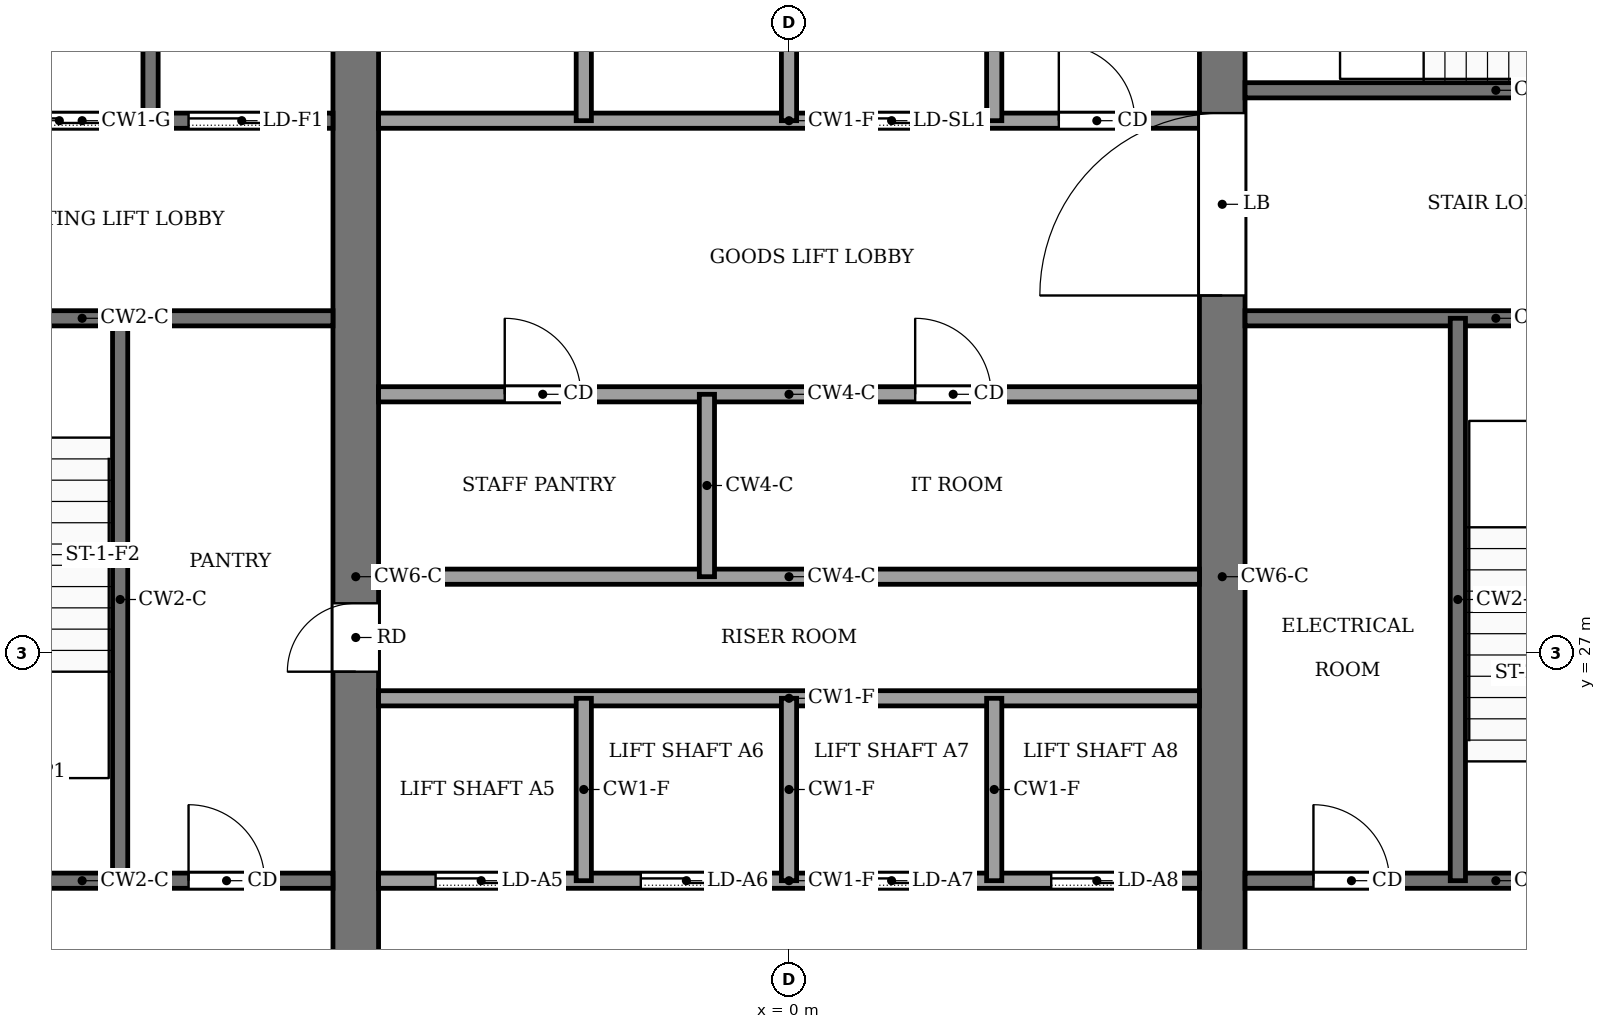
"""IFC4 building model, lengths in metres.
Left out: names, types, materials, properties, quantities, classifications, styles, units other than length and angle.
Written with IfcOpenShell. Run it as: python <this file> out.ifc"""

import sys

from ifc_helpers import new_model, si_unit, direction, frame, frame_2d, origin, place, context, subcontext, project, spatial, rectangle, extrude, element, fill, save


model = new_model("IFC4")
c1 = context("Model", 3, precision=1e-05, world=origin(), true_north=direction((0.0, 1.0)))
c2 = subcontext(c1, "Body", "Model", "MODEL_VIEW")
j1 = project(units=[si_unit("LENGTHUNIT", "METRE"), si_unit("PLANEANGLEUNIT", "RADIAN")], contexts=[c1])
p1 = place(None, origin())
s1 = spatial("IfcSite", under=j1, at=p1, CompositionType="ELEMENT")
p2 = place(p1, origin())
s2 = spatial("IfcBuilding", under=s1, at=p2, CompositionType="ELEMENT")
p3 = place(p2, frame((0.0, 0.0, 238.0)))
s3 = spatial("IfcBuildingStorey", under=s2, at=p3, CompositionType="ELEMENT", Elevation=238.0)
p4 = place(p3, frame((-5.7, 18.4, -0.13), z_axis=(0.0, 0.0, 1.0), x_axis=(0.0, 1.0, 0.0)))
e1 = element("IfcWall", 1, at=p4, inside=s3, PredefinedType="SHEAR", context=c2, shape_type="SweptSolid", body=[
    extrude(rectangle(XDim=19.2, YDim=0.6, at=frame_2d((9.6, 0.0))), origin(), (0.0, 0.0, 1.0), 4.0),
])
p5 = place(p4, frame((8.35, 0.0, 0.13)))
e2 = element("IfcOpeningElement", 2, at=p5, cuts=e1, PredefinedType="OPENING", context=c2, shape_type="SweptSolid", body=[
    extrude(rectangle(XDim=0.9, YDim=2.1, at=frame_2d((0.45, 1.05))), frame((0.0, 0.31, 0.0), z_axis=(0.0, -1.0, 0.0), x_axis=(1.0, 0.0, 0.0)), (0.0, 0.0, 1.0), 0.62),
])
p6 = place(p3, frame((5.7, 18.4, -0.13), z_axis=(0.0, 0.0, 1.0), x_axis=(0.0, 1.0, 0.0)))
e3 = element("IfcWall", 3, at=p6, inside=s3, PredefinedType="SHEAR", context=c2, shape_type="SweptSolid", body=[
    extrude(rectangle(XDim=19.2, YDim=0.6, at=frame_2d((9.6, 0.0))), origin(), (0.0, 0.0, 1.0), 4.0),
])
p7 = place(p6, frame((13.3, 0.0, 0.13)))
e4 = element("IfcOpeningElement", 4, at=p7, cuts=e3, PredefinedType="OPENING", context=c2, shape_type="SweptSolid", body=[
    extrude(rectangle(XDim=2.4, YDim=2.4, at=frame_2d((1.2, 1.2))), frame((0.0, 0.31, 0.0), z_axis=(0.0, -1.0, 0.0), x_axis=(1.0, 0.0, 0.0)), (0.0, 0.0, 1.0), 0.62),
])
p8 = place(p3, frame((-12.6, 24.0, 0.0), z_axis=(0.0, 0.0, 1.0), x_axis=(1.0, 0.0, 0.0)))
e5 = element("IfcWall", 5, at=p8, inside=s3, PredefinedType="PARTITIONING", context=c2, shape_type="SweptSolid", body=[
    extrude(rectangle(XDim=6.6, YDim=0.2, at=frame_2d((3.3, 0.0))), origin(), (0.0, 0.0, 1.0), 3.87),
])
p9 = place(p8, frame((4.7, 0.0, 0.0)))
e6 = element("IfcOpeningElement", 6, at=p9, cuts=e5, PredefinedType="OPENING", context=c2, shape_type="SweptSolid", body=[
    extrude(rectangle(XDim=1.0, YDim=2.1, at=frame_2d((0.5, 1.05))), frame((0.0, 0.11, 0.0), z_axis=(0.0, -1.0, 0.0), x_axis=(1.0, 0.0, 0.0)), (0.0, 0.0, 1.0), 0.22),
])
p10 = place(p3, frame((-5.4, 24.0, 0.0), z_axis=(0.0, 0.0, 1.0), x_axis=(1.0, 0.0, 0.0)))
e7 = element("IfcWall", 7, at=p10, inside=s3, PredefinedType="PARTITIONING", context=c2, shape_type="SweptSolid", body=[
    extrude(rectangle(XDim=10.8, YDim=0.2, at=frame_2d((5.4, 0.0))), origin(), (0.0, 0.0, 1.0), 3.87),
])
p11 = place(p10, frame((0.75, 0.0, 0.0)))
e8 = element("IfcOpeningElement", 8, at=p11, cuts=e7, PredefinedType="OPENING", context=c2, shape_type="SweptSolid", body=[
    extrude(rectangle(XDim=1.2, YDim=2.2, at=frame_2d((0.6, 1.1))), frame((0.0, 0.11, 0.0), z_axis=(0.0, -1.0, 0.0), x_axis=(1.0, 0.0, 0.0)), (0.0, 0.0, 1.0), 0.22),
])
p12 = place(p10, frame((3.45, 0.0, 0.0)))
e9 = element("IfcOpeningElement", 9, at=p12, cuts=e7, PredefinedType="OPENING", context=c2, shape_type="SweptSolid", body=[
    extrude(rectangle(XDim=1.2, YDim=2.2, at=frame_2d((0.6, 1.1))), frame((0.0, 0.11, 0.0), z_axis=(0.0, -1.0, 0.0), x_axis=(1.0, 0.0, 0.0)), (0.0, 0.0, 1.0), 0.22),
])
p13 = place(p10, frame((6.15, 0.0, 0.0)))
e10 = element("IfcOpeningElement", 10, at=p13, cuts=e7, PredefinedType="OPENING", context=c2, shape_type="SweptSolid", body=[
    extrude(rectangle(XDim=1.2, YDim=2.2, at=frame_2d((0.6, 1.1))), frame((0.0, 0.11, 0.0), z_axis=(0.0, -1.0, 0.0), x_axis=(1.0, 0.0, 0.0)), (0.0, 0.0, 1.0), 0.22),
])
p14 = place(p10, frame((8.85, 0.0, 0.0)))
e11 = element("IfcOpeningElement", 11, at=p14, cuts=e7, PredefinedType="OPENING", context=c2, shape_type="SweptSolid", body=[
    extrude(rectangle(XDim=1.2, YDim=2.2, at=frame_2d((0.6, 1.1))), frame((0.0, 0.11, 0.0), z_axis=(0.0, -1.0, 0.0), x_axis=(1.0, 0.0, 0.0)), (0.0, 0.0, 1.0), 0.22),
])
p15 = place(p3, frame((6.0, 24.0, 0.0), z_axis=(0.0, 0.0, 1.0), x_axis=(1.0, 0.0, 0.0)))
e12 = element("IfcWall", 12, at=p15, inside=s3, PredefinedType="PARTITIONING", context=c2, shape_type="SweptSolid", body=[
    extrude(rectangle(XDim=6.6, YDim=0.2, at=frame_2d((3.3, 0.0))), origin(), (0.0, 0.0, 1.0), 3.87),
])
p16 = place(p15, frame((0.9, 0.0, 0.0)))
e13 = element("IfcOpeningElement", 13, at=p16, cuts=e12, PredefinedType="OPENING", context=c2, shape_type="SweptSolid", body=[
    extrude(rectangle(XDim=1.0, YDim=2.1, at=frame_2d((0.5, 1.05))), frame((0.0, 0.11, 0.0), z_axis=(0.0, -1.0, 0.0), x_axis=(1.0, 0.0, 0.0)), (0.0, 0.0, 1.0), 0.22),
])
p17 = place(p15, frame((4.4, 0.0, 0.0)))
e14 = element("IfcOpeningElement", 14, at=p17, cuts=e12, PredefinedType="OPENING", context=c2, shape_type="SweptSolid", body=[
    extrude(rectangle(XDim=1.2, YDim=2.2, at=frame_2d((0.6, 1.1))), frame((0.0, 0.11, 0.0), z_axis=(0.0, -1.0, 0.0), x_axis=(1.0, 0.0, 0.0)), (0.0, 0.0, 1.0), 0.22),
])
for number, where, z_axis, x_axis in (
    (15, (-5.4, 26.4, 0.0), (0.0, 0.0, 1.0), (1.0, 0.0, 0.0)),
    (16, (-5.4, 28.0, 0.0), (0.0, 0.0, 1.0), (1.0, 0.0, 0.0)),
):
    element("IfcWall", number, at=place(p3, frame(where, z_axis=z_axis, x_axis=x_axis)), inside=s3, PredefinedType="PARTITIONING", context=c2, shape_type="SweptSolid", body=[
        extrude(rectangle(XDim=10.8, YDim=0.2, at=frame_2d((5.4, 0.0))), origin(), (0.0, 0.0, 1.0), 3.87),
    ])
p18 = place(p3, frame((-5.4, 30.4, 0.0), z_axis=(0.0, 0.0, 1.0), x_axis=(1.0, 0.0, 0.0)))
e17 = element("IfcWall", 17, at=p18, inside=s3, PredefinedType="PARTITIONING", context=c2, shape_type="SweptSolid", body=[
    extrude(rectangle(XDim=10.8, YDim=0.2, at=frame_2d((5.4, 0.0))), origin(), (0.0, 0.0, 1.0), 3.87),
])
p19 = place(p18, frame((1.66, 0.0, 0.0)))
e18 = element("IfcOpeningElement", 18, at=p19, cuts=e17, PredefinedType="OPENING", context=c2, shape_type="SweptSolid", body=[
    extrude(rectangle(XDim=1.0, YDim=2.1, at=frame_2d((0.5, 1.05))), frame((0.0, 0.11, 0.0), z_axis=(0.0, -1.0, 0.0), x_axis=(1.0, 0.0, 0.0)), (0.0, 0.0, 1.0), 0.22),
])
p20 = place(p18, frame((7.06, 0.0, 0.0)))
e19 = element("IfcOpeningElement", 19, at=p20, cuts=e17, PredefinedType="OPENING", context=c2, shape_type="SweptSolid", body=[
    extrude(rectangle(XDim=1.0, YDim=2.1, at=frame_2d((0.5, 1.05))), frame((0.0, 0.11, 0.0), z_axis=(0.0, -1.0, 0.0), x_axis=(1.0, 0.0, 0.0)), (0.0, 0.0, 1.0), 0.22),
])
p21 = place(p3, frame((-12.6, 31.4, 0.0), z_axis=(0.0, 0.0, 1.0), x_axis=(1.0, 0.0, 0.0)))
e20 = element("IfcWall", 20, at=p21, inside=s3, PredefinedType="PARTITIONING", context=c2, shape_type="SweptSolid", body=[
    extrude(rectangle(XDim=6.6, YDim=0.2, at=frame_2d((3.3, 0.0))), origin(), (0.0, 0.0, 1.0), 3.87),
])
p22 = place(p21, frame((1.0, 0.0, 0.0)))
e21 = element("IfcOpeningElement", 21, at=p22, cuts=e20, PredefinedType="OPENING", context=c2, shape_type="SweptSolid", body=[
    extrude(rectangle(XDim=1.2, YDim=2.2, at=frame_2d((0.6, 1.1))), frame((0.0, 0.11, 0.0), z_axis=(0.0, -1.0, 0.0), x_axis=(1.0, 0.0, 0.0)), (0.0, 0.0, 1.0), 0.22),
])
p23 = place(p3, frame((6.0, 31.4, 0.0), z_axis=(0.0, 0.0, 1.0), x_axis=(1.0, 0.0, 0.0)))
e22 = element("IfcWall", 22, at=p23, inside=s3, PredefinedType="PARTITIONING", context=c2, shape_type="SweptSolid", body=[
    extrude(rectangle(XDim=6.6, YDim=0.2, at=frame_2d((3.3, 0.0))), origin(), (0.0, 0.0, 1.0), 3.87),
])
p24 = place(p3, frame((-12.6, 34.0, 0.0), z_axis=(0.0, 0.0, 1.0), x_axis=(1.0, 0.0, 0.0)))
e23 = element("IfcWall", 23, at=p24, inside=s3, PredefinedType="PARTITIONING", context=c2, shape_type="SweptSolid", body=[
    extrude(rectangle(XDim=6.6, YDim=0.2, at=frame_2d((3.3, 0.0))), origin(), (0.0, 0.0, 1.0), 3.87),
])
p25 = place(p24, frame((4.7, 0.0, 0.0)))
e24 = element("IfcOpeningElement", 24, at=p25, cuts=e23, PredefinedType="OPENING", context=c2, shape_type="SweptSolid", body=[
    extrude(rectangle(XDim=1.4, YDim=2.2, at=frame_2d((0.7, 1.1))), frame((0.0, 0.11, 0.0), z_axis=(0.0, -1.0, 0.0), x_axis=(1.0, 0.0, 0.0)), (0.0, 0.0, 1.0), 0.22),
])
p26 = place(p24, frame((2.3, 0.0, 0.0)))
e25 = element("IfcOpeningElement", 25, at=p26, cuts=e23, PredefinedType="OPENING", context=c2, shape_type="SweptSolid", body=[
    extrude(rectangle(XDim=1.4, YDim=2.2, at=frame_2d((0.7, 1.1))), frame((0.0, 0.11, 0.0), z_axis=(0.0, -1.0, 0.0), x_axis=(1.0, 0.0, 0.0)), (0.0, 0.0, 1.0), 0.22),
])
p27 = place(p24, frame((0.45, 0.0, 0.0)))
e26 = element("IfcOpeningElement", 26, at=p27, cuts=e23, PredefinedType="OPENING", context=c2, shape_type="SweptSolid", body=[
    extrude(rectangle(XDim=0.9, YDim=2.1, at=frame_2d((0.45, 1.05))), frame((0.0, 0.11, 0.0), z_axis=(0.0, -1.0, 0.0), x_axis=(1.0, 0.0, 0.0)), (0.0, 0.0, 1.0), 0.22),
])
p28 = place(p3, frame((-5.4, 34.0, 0.0), z_axis=(0.0, 0.0, 1.0), x_axis=(1.0, 0.0, 0.0)))
e27 = element("IfcWall", 27, at=p28, inside=s3, PredefinedType="PARTITIONING", context=c2, shape_type="SweptSolid", body=[
    extrude(rectangle(XDim=10.8, YDim=0.2, at=frame_2d((5.4, 0.0))), origin(), (0.0, 0.0, 1.0), 3.87),
])
p29 = place(p28, frame((6.15, 0.0, 0.0)))
e28 = element("IfcOpeningElement", 28, at=p29, cuts=e27, PredefinedType="OPENING", context=c2, shape_type="SweptSolid", body=[
    extrude(rectangle(XDim=1.2, YDim=2.2, at=frame_2d((0.6, 1.1))), frame((0.0, 0.11, 0.0), z_axis=(0.0, -1.0, 0.0), x_axis=(1.0, 0.0, 0.0)), (0.0, 0.0, 1.0), 0.22),
])
p30 = place(p28, frame((8.95, 0.0, 0.0)))
e29 = element("IfcOpeningElement", 29, at=p30, cuts=e27, PredefinedType="OPENING", context=c2, shape_type="SweptSolid", body=[
    extrude(rectangle(XDim=1.0, YDim=2.1, at=frame_2d((0.5, 1.05))), frame((0.0, 0.11, 0.0), z_axis=(0.0, -1.0, 0.0), x_axis=(1.0, 0.0, 0.0)), (0.0, 0.0, 1.0), 0.22),
])
p31 = place(p3, frame((6.0, 34.4, 0.0), z_axis=(0.0, 0.0, 1.0), x_axis=(1.0, 0.0, 0.0)))
e30 = element("IfcWall", 30, at=p31, inside=s3, PredefinedType="PARTITIONING", context=c2, shape_type="SweptSolid", body=[
    extrude(rectangle(XDim=6.6, YDim=0.2, at=frame_2d((3.3, 0.0))), origin(), (0.0, 0.0, 1.0), 3.87),
])
p32 = place(p31, frame((4.8, 0.0, 0.0)))
e31 = element("IfcOpeningElement", 31, at=p32, cuts=e30, PredefinedType="OPENING", context=c2, shape_type="SweptSolid", body=[
    extrude(rectangle(XDim=1.2, YDim=2.2, at=frame_2d((0.6, 1.1))), frame((0.0, 0.11, 0.0), z_axis=(0.0, -1.0, 0.0), x_axis=(1.0, 0.0, 0.0)), (0.0, 0.0, 1.0), 0.22),
])
p33 = place(p3, frame((-8.8, 24.0, 0.0), z_axis=(0.0, 0.0, 1.0), x_axis=(0.0, 1.0, 0.0)))
e32 = element("IfcWall", 32, at=p33, inside=s3, PredefinedType="PARTITIONING", context=c2, shape_type="SweptSolid", body=[
    extrude(rectangle(XDim=7.4, YDim=0.2, at=frame_2d((3.7, 0.0))), origin(), (0.0, 0.0, 1.0), 3.87),
])
p34 = place(p3, frame((-8.4, 34.0, 0.0), z_axis=(0.0, 0.0, 1.0), x_axis=(0.0, 1.0, 0.0)))
e33 = element("IfcWall", 33, at=p34, inside=s3, PredefinedType="PARTITIONING", context=c2, shape_type="SweptSolid", body=[
    extrude(rectangle(XDim=3.6, YDim=0.2, at=frame_2d((1.8, 0.0))), origin(), (0.0, 0.0, 1.0), 3.87),
])
p35 = place(p3, frame((-2.7, 24.0, 0.0), z_axis=(0.0, 0.0, 1.0), x_axis=(0.0, 1.0, 0.0)))
e34 = element("IfcWall", 34, at=p35, inside=s3, PredefinedType="PARTITIONING", context=c2, shape_type="SweptSolid", body=[
    extrude(rectangle(XDim=2.4, YDim=0.2, at=frame_2d((1.2, 0.0))), origin(), (0.0, 0.0, 1.0), 3.87),
])
p36 = place(p3, frame((-2.7, 34.0, 0.0), z_axis=(0.0, 0.0, 1.0), x_axis=(0.0, 1.0, 0.0)))
e35 = element("IfcWall", 35, at=p36, inside=s3, PredefinedType="PARTITIONING", context=c2, shape_type="SweptSolid", body=[
    extrude(rectangle(XDim=3.6, YDim=0.2, at=frame_2d((1.8, 0.0))), origin(), (0.0, 0.0, 1.0), 3.87),
])
for number, where, z_axis, x_axis in (
    (36, (-1.08, 28.0, 0.0), (0.0, 0.0, 1.0), (0.0, 1.0, 0.0)),
    (37, (0.0, 24.0, 0.0), (0.0, 0.0, 1.0), (0.0, 1.0, 0.0)),
):
    element("IfcWall", number, at=place(p3, frame(where, z_axis=z_axis, x_axis=x_axis)), inside=s3, PredefinedType="PARTITIONING", context=c2, shape_type="SweptSolid", body=[
        extrude(rectangle(XDim=2.4, YDim=0.2, at=frame_2d((1.2, 0.0))), origin(), (0.0, 0.0, 1.0), 3.87),
    ])
p37 = place(p3, frame((0.0, 34.0, 0.0), z_axis=(0.0, 0.0, 1.0), x_axis=(0.0, 1.0, 0.0)))
e38 = element("IfcWall", 38, at=p37, inside=s3, PredefinedType="PARTITIONING", context=c2, shape_type="SweptSolid", body=[
    extrude(rectangle(XDim=3.6, YDim=0.2, at=frame_2d((1.8, 0.0))), origin(), (0.0, 0.0, 1.0), 3.87),
])
p38 = place(p3, frame((2.7, 24.0, 0.0), z_axis=(0.0, 0.0, 1.0), x_axis=(0.0, 1.0, 0.0)))
e39 = element("IfcWall", 39, at=p38, inside=s3, PredefinedType="PARTITIONING", context=c2, shape_type="SweptSolid", body=[
    extrude(rectangle(XDim=2.4, YDim=0.2, at=frame_2d((1.2, 0.0))), origin(), (0.0, 0.0, 1.0), 3.87),
])
p39 = place(p3, frame((2.7, 34.0, 0.0), z_axis=(0.0, 0.0, 1.0), x_axis=(0.0, 1.0, 0.0)))
e40 = element("IfcWall", 40, at=p39, inside=s3, PredefinedType="PARTITIONING", context=c2, shape_type="SweptSolid", body=[
    extrude(rectangle(XDim=3.6, YDim=0.2, at=frame_2d((1.8, 0.0))), origin(), (0.0, 0.0, 1.0), 3.87),
])
p40 = place(p3, frame((8.8, 24.0, 0.0), z_axis=(0.0, 0.0, 1.0), x_axis=(0.0, 1.0, 0.0)))
e41 = element("IfcWall", 41, at=p40, inside=s3, PredefinedType="PARTITIONING", context=c2, shape_type="SweptSolid", body=[
    extrude(rectangle(XDim=7.4, YDim=0.2, at=frame_2d((3.7, 0.0))), origin(), (0.0, 0.0, 1.0), 3.87),
])
p41 = place(p11, origin())
e42 = element("IfcDoor", 42, at=p41, inside=s3, OperationType="SLIDING_TO_LEFT", PredefinedType="DOOR", context=c2, shape_type="SweptSolid", body=[
    extrude(rectangle(XDim=1.2, YDim=2.2, at=frame_2d((0.6, 1.1))), frame((0.0, 0.025, 0.0), z_axis=(0.0, -1.0, 0.0), x_axis=(1.0, 0.0, 0.0)), (0.0, 0.0, 1.0), 0.05),
])
fill(e8, e42)
p42 = place(p12, origin())
e43 = element("IfcDoor", 43, at=p42, inside=s3, OperationType="SLIDING_TO_LEFT", PredefinedType="DOOR", context=c2, shape_type="SweptSolid", body=[
    extrude(rectangle(XDim=1.2, YDim=2.2, at=frame_2d((0.6, 1.1))), frame((0.0, 0.025, 0.0), z_axis=(0.0, -1.0, 0.0), x_axis=(1.0, 0.0, 0.0)), (0.0, 0.0, 1.0), 0.05),
])
fill(e9, e43)
p43 = place(p13, origin())
e44 = element("IfcDoor", 44, at=p43, inside=s3, OperationType="SLIDING_TO_LEFT", PredefinedType="DOOR", context=c2, shape_type="SweptSolid", body=[
    extrude(rectangle(XDim=1.2, YDim=2.2, at=frame_2d((0.6, 1.1))), frame((0.0, 0.025, 0.0), z_axis=(0.0, -1.0, 0.0), x_axis=(1.0, 0.0, 0.0)), (0.0, 0.0, 1.0), 0.05),
])
fill(e10, e44)
p44 = place(p14, origin())
e45 = element("IfcDoor", 45, at=p44, inside=s3, OperationType="SLIDING_TO_LEFT", PredefinedType="DOOR", context=c2, shape_type="SweptSolid", body=[
    extrude(rectangle(XDim=1.2, YDim=2.2, at=frame_2d((0.6, 1.1))), frame((0.0, 0.025, 0.0), z_axis=(0.0, -1.0, 0.0), x_axis=(1.0, 0.0, 0.0)), (0.0, 0.0, 1.0), 0.05),
])
fill(e11, e45)
p45 = place(p29, origin())
e46 = element("IfcDoor", 46, at=p45, inside=s3, OperationType="SLIDING_TO_LEFT", PredefinedType="DOOR", context=c2, shape_type="SweptSolid", body=[
    extrude(rectangle(XDim=1.2, YDim=2.2, at=frame_2d((0.6, 1.1))), frame((0.0, 0.025, 0.0), z_axis=(0.0, -1.0, 0.0), x_axis=(1.0, 0.0, 0.0)), (0.0, 0.0, 1.0), 0.05),
])
fill(e28, e46)
p46 = place(p25, origin())
e47 = element("IfcDoor", 47, at=p46, inside=s3, OperationType="SLIDING_TO_LEFT", PredefinedType="DOOR", context=c2, shape_type="SweptSolid", body=[
    extrude(rectangle(XDim=1.4, YDim=2.2, at=frame_2d((0.7, 1.1))), frame((0.0, 0.025, 0.0), z_axis=(0.0, -1.0, 0.0), x_axis=(1.0, 0.0, 0.0)), (0.0, 0.0, 1.0), 0.05),
])
fill(e24, e47)
p47 = place(p26, origin())
e48 = element("IfcDoor", 48, at=p47, inside=s3, OperationType="SLIDING_TO_LEFT", PredefinedType="DOOR", context=c2, shape_type="SweptSolid", body=[
    extrude(rectangle(XDim=1.4, YDim=2.2, at=frame_2d((0.7, 1.1))), frame((0.0, 0.025, 0.0), z_axis=(0.0, -1.0, 0.0), x_axis=(1.0, 0.0, 0.0)), (0.0, 0.0, 1.0), 0.05),
])
fill(e25, e48)
p48 = place(p19, origin())
e49 = element("IfcDoor", 49, at=p48, inside=s3, OperationType="SINGLE_SWING_RIGHT", PredefinedType="DOOR", context=c2, shape_type="SweptSolid", body=[
    extrude(rectangle(XDim=1.0, YDim=2.1, at=frame_2d((0.5, 1.05))), frame((0.0, 0.025, 0.0), z_axis=(0.0, -1.0, 0.0), x_axis=(1.0, 0.0, 0.0)), (0.0, 0.0, 1.0), 0.05),
])
fill(e18, e49)
p49 = place(p20, origin())
e50 = element("IfcDoor", 50, at=p49, inside=s3, OperationType="SINGLE_SWING_LEFT", PredefinedType="DOOR", context=c2, shape_type="SweptSolid", body=[
    extrude(rectangle(XDim=1.0, YDim=2.1, at=frame_2d((0.5, 1.05))), frame((0.0, 0.025, 0.0), z_axis=(0.0, -1.0, 0.0), x_axis=(1.0, 0.0, 0.0)), (0.0, 0.0, 1.0), 0.05),
])
fill(e19, e50)
p50 = place(p9, origin())
e51 = element("IfcDoor", 51, at=p50, inside=s3, OperationType="SINGLE_SWING_RIGHT", PredefinedType="DOOR", context=c2, shape_type="SweptSolid", body=[
    extrude(rectangle(XDim=1.0, YDim=2.1, at=frame_2d((0.5, 1.05))), frame((0.0, 0.025, 0.0), z_axis=(0.0, -1.0, 0.0), x_axis=(1.0, 0.0, 0.0)), (0.0, 0.0, 1.0), 0.05),
])
fill(e6, e51)
p51 = place(p16, origin())
e52 = element("IfcDoor", 52, at=p51, inside=s3, OperationType="SINGLE_SWING_LEFT", PredefinedType="DOOR", context=c2, shape_type="SweptSolid", body=[
    extrude(rectangle(XDim=1.0, YDim=2.1, at=frame_2d((0.5, 1.05))), frame((0.0, 0.025, 0.0), z_axis=(0.0, -1.0, 0.0), x_axis=(1.0, 0.0, 0.0)), (0.0, 0.0, 1.0), 0.05),
])
fill(e13, e52)
p52 = place(p30, origin())
e53 = element("IfcDoor", 53, at=p52, inside=s3, OperationType="SINGLE_SWING_LEFT", PredefinedType="DOOR", context=c2, shape_type="SweptSolid", body=[
    extrude(rectangle(XDim=1.0, YDim=2.1, at=frame_2d((0.5, 1.05))), frame((0.0, 0.025, 0.0), z_axis=(0.0, -1.0, 0.0), x_axis=(1.0, 0.0, 0.0)), (0.0, 0.0, 1.0), 0.05),
])
fill(e29, e53)
p53 = place(p5, origin())
e54 = element("IfcDoor", 54, at=p53, inside=s3, OperationType="SINGLE_SWING_RIGHT", PredefinedType="DOOR", context=c2, shape_type="SweptSolid", body=[
    extrude(rectangle(XDim=0.9, YDim=2.1, at=frame_2d((0.45, 1.05))), frame((0.0, 0.025, 0.0), z_axis=(0.0, -1.0, 0.0), x_axis=(1.0, 0.0, 0.0)), (0.0, 0.0, 1.0), 0.05),
])
fill(e2, e54)
p54 = place(p7, origin())
e55 = element("IfcDoor", 55, at=p54, inside=s3, OperationType="DOUBLE_DOOR_SINGLE_SWING", PredefinedType="DOOR", context=c2, shape_type="SweptSolid", body=[
    extrude(rectangle(XDim=2.4, YDim=2.4, at=frame_2d((1.2, 1.2))), frame((0.0, 0.025, 0.0), z_axis=(0.0, -1.0, 0.0), x_axis=(1.0, 0.0, 0.0)), (0.0, 0.0, 1.0), 0.05),
])
fill(e4, e55)
save(model, sys.argv[1])
